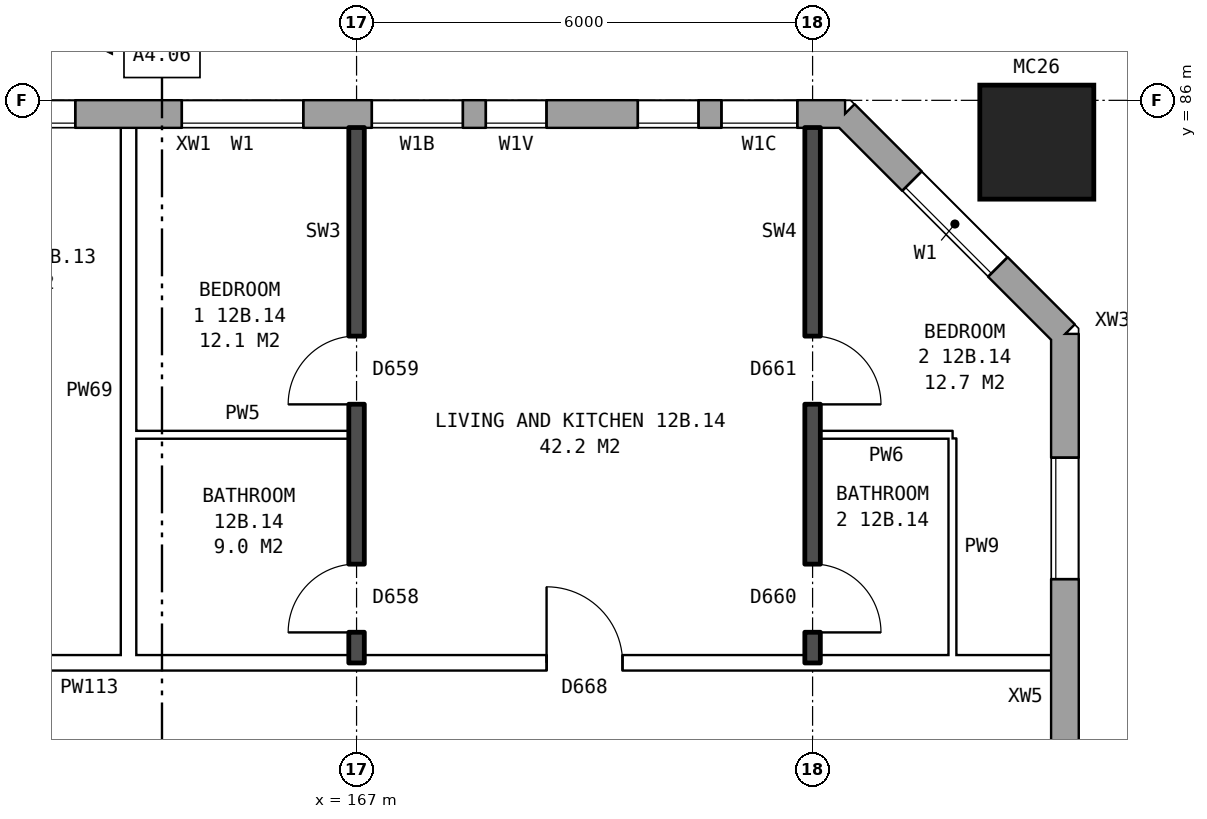
"""IFC4 building model, lengths in metres.
Left out: names, types, materials, properties, quantities, classifications, styles, units other than length and angle.
Written with IfcOpenShell. Run it as: python <this file> out.ifc"""

import sys

from ifc_helpers import new_model, si_unit, direction, frame, frame_2d, origin, origin_2d, place, context, subcontext, project, spatial, rectangle, hollow_rectangle, extrude, element, fill, save


model = new_model("IFC4")
c1 = context("Model", 3, precision=1e-05, world=origin(), true_north=direction((0.0, 1.0)))
c2 = subcontext(c1, "Body", "Model", "MODEL_VIEW")
j1 = project(units=[si_unit("LENGTHUNIT", "METRE"), si_unit("PLANEANGLEUNIT", "RADIAN")], contexts=[c1])
p1 = place(None, origin())
s1 = spatial("IfcSite", under=j1, at=p1, CompositionType="ELEMENT")
p2 = place(p1, origin())
s2 = spatial("IfcBuilding", under=s1, at=p2, CompositionType="ELEMENT")
p3 = place(p2, frame((0.0, 0.0, 47.4)))
s3 = spatial("IfcBuildingStorey", under=s2, at=p3, CompositionType="ELEMENT", Elevation=47.4)
p4 = place(p3, frame((175.95, 85.45, 0.0), z_axis=(0.0, 0.0, 1.0), x_axis=(1.0, 0.0, 0.0)))
e1 = element("IfcColumn", 1, at=p4, inside=s3, PredefinedType="COLUMN", context=c2, shape_type="SweptSolid", body=[
    extrude(hollow_rectangle(XDim=1.5, YDim=1.5, WallThickness=0.08, at=origin_2d()), origin(), (0.0, 0.0, 1.0), 3.1),
])
p5 = place(p3, frame((176.32, 57.075, 0.0), z_axis=(0.0, 0.0, 1.0), x_axis=(0.0, 1.0, 0.0)))
e2 = element("IfcWall", 2, at=p5, inside=s3, PredefinedType="STANDARD", context=c2, shape_type="SweptSolid", body=[
    extrude(rectangle(XDim=25.851, YDim=0.36, at=frame_2d((12.925, 0.0))), origin(), (0.0, 0.0, 1.0), 2.85),
])
p6 = place(p5, frame((1.625, 0.0, 0.8)))
e3 = element("IfcOpeningElement", 3, at=p6, cuts=e2, PredefinedType="OPENING", context=c2, shape_type="SweptSolid", body=[
    extrude(rectangle(XDim=1.6, YDim=1.8, at=frame_2d((0.8, 0.9))), frame((0.0, 0.19, 0.0), z_axis=(0.0, -1.0, 0.0), x_axis=(1.0, 0.0, 0.0)), (0.0, 0.0, 1.0), 0.38),
])
p7 = place(p5, frame((6.225, 0.0, 0.8)))
e4 = element("IfcOpeningElement", 4, at=p7, cuts=e2, PredefinedType="OPENING", context=c2, shape_type="SweptSolid", body=[
    extrude(rectangle(XDim=1.0, YDim=0.9, at=frame_2d((0.5, 0.45))), frame((0.0, 0.19, 0.0), z_axis=(0.0, -1.0, 0.0), x_axis=(1.0, 0.0, 0.0)), (0.0, 0.0, 1.0), 0.38),
])
p8 = place(p5, frame((7.625, 0.0, 0.8)))
e5 = element("IfcOpeningElement", 5, at=p8, cuts=e2, PredefinedType="OPENING", context=c2, shape_type="SweptSolid", body=[
    extrude(rectangle(XDim=1.6, YDim=1.8, at=frame_2d((0.8, 0.9))), frame((0.0, 0.19, 0.0), z_axis=(0.0, -1.0, 0.0), x_axis=(1.0, 0.0, 0.0)), (0.0, 0.0, 1.0), 0.38),
])
p9 = place(p5, frame((10.625, 0.0, 0.8)))
e6 = element("IfcOpeningElement", 6, at=p9, cuts=e2, PredefinedType="OPENING", context=c2, shape_type="SweptSolid", body=[
    extrude(rectangle(XDim=1.6, YDim=1.8, at=frame_2d((0.8, 0.9))), frame((0.0, 0.19, 0.0), z_axis=(0.0, -1.0, 0.0), x_axis=(1.0, 0.0, 0.0)), (0.0, 0.0, 1.0), 0.38),
])
p10 = place(p5, frame((13.625, 0.0, 0.8)))
e7 = element("IfcOpeningElement", 7, at=p10, cuts=e2, PredefinedType="OPENING", context=c2, shape_type="SweptSolid", body=[
    extrude(rectangle(XDim=1.6, YDim=1.8, at=frame_2d((0.8, 0.9))), frame((0.0, 0.19, 0.0), z_axis=(0.0, -1.0, 0.0), x_axis=(1.0, 0.0, 0.0)), (0.0, 0.0, 1.0), 0.38),
])
p11 = place(p5, frame((16.625, 0.0, 0.8)))
e8 = element("IfcOpeningElement", 8, at=p11, cuts=e2, PredefinedType="OPENING", context=c2, shape_type="SweptSolid", body=[
    extrude(rectangle(XDim=1.6, YDim=1.8, at=frame_2d((0.8, 0.9))), frame((0.0, 0.19, 0.0), z_axis=(0.0, -1.0, 0.0), x_axis=(1.0, 0.0, 0.0)), (0.0, 0.0, 1.0), 0.38),
])
p12 = place(p5, frame((9.525, 0.0, 0.8)))
e9 = element("IfcOpeningElement", 9, at=p12, cuts=e2, PredefinedType="OPENING", context=c2, shape_type="SweptSolid", body=[
    extrude(rectangle(XDim=0.8, YDim=1.8, at=frame_2d((0.4, 0.9))), frame((0.0, 0.19, 0.0), z_axis=(0.0, -1.0, 0.0), x_axis=(1.0, 0.0, 0.0)), (0.0, 0.0, 1.0), 0.38),
])
p13 = place(p5, frame((22.625, 0.0, 0.8)))
e10 = element("IfcOpeningElement", 10, at=p13, cuts=e2, PredefinedType="OPENING", context=c2, shape_type="SweptSolid", body=[
    extrude(rectangle(XDim=1.6, YDim=1.8, at=frame_2d((0.8, 0.9))), frame((0.0, 0.19, 0.0), z_axis=(0.0, -1.0, 0.0), x_axis=(1.0, 0.0, 0.0)), (0.0, 0.0, 1.0), 0.38),
])
p14 = place(p5, frame((12.525, 0.0, 0.8)))
e11 = element("IfcOpeningElement", 11, at=p14, cuts=e2, PredefinedType="OPENING", context=c2, shape_type="SweptSolid", body=[
    extrude(rectangle(XDim=0.8, YDim=1.8, at=frame_2d((0.4, 0.9))), frame((0.0, 0.19, 0.0), z_axis=(0.0, -1.0, 0.0), x_axis=(1.0, 0.0, 0.0)), (0.0, 0.0, 1.0), 0.38),
])
p15 = place(p5, frame((15.525, 0.0, 0.8)))
e12 = element("IfcOpeningElement", 12, at=p15, cuts=e2, PredefinedType="OPENING", context=c2, shape_type="SweptSolid", body=[
    extrude(rectangle(XDim=0.8, YDim=1.8, at=frame_2d((0.4, 0.9))), frame((0.0, 0.19, 0.0), z_axis=(0.0, -1.0, 0.0), x_axis=(1.0, 0.0, 0.0)), (0.0, 0.0, 1.0), 0.38),
])
p16 = place(p5, frame((18.525, 0.0, 0.8)))
e13 = element("IfcOpeningElement", 13, at=p16, cuts=e2, PredefinedType="OPENING", context=c2, shape_type="SweptSolid", body=[
    extrude(rectangle(XDim=1.0, YDim=0.9, at=frame_2d((0.5, 0.45))), frame((0.0, 0.19, 0.0), z_axis=(0.0, -1.0, 0.0), x_axis=(1.0, 0.0, 0.0)), (0.0, 0.0, 1.0), 0.38),
])
p17 = place(p3, frame((176.32, 82.925, 0.0), z_axis=(0.0, 0.0, 1.0), x_axis=(-0.707106781187, 0.707106781187, 0.0)))
e14 = element("IfcWall", 14, at=p17, inside=s3, PredefinedType="STANDARD", context=c2, shape_type="SweptSolid", body=[
    extrude(rectangle(XDim=4.094, YDim=0.36, at=frame_2d((2.047, 0.0))), origin(), (0.0, 0.0, 1.0), 2.85),
])
p18 = place(p17, frame((1.247, 0.0, 0.8)))
e15 = element("IfcOpeningElement", 15, at=p18, cuts=e14, PredefinedType="OPENING", context=c2, shape_type="SweptSolid", body=[
    extrude(rectangle(XDim=1.6, YDim=1.8, at=frame_2d((0.8, 0.9))), frame((0.0, 0.19, 0.0), z_axis=(0.0, -1.0, 0.0), x_axis=(1.0, 0.0, 0.0)), (0.0, 0.0, 1.0), 0.38),
])
p19 = place(p3, frame((173.425, 85.82, 0.0), z_axis=(0.0, 0.0, 1.0), x_axis=(-1.0, 0.0, 0.0)))
e16 = element("IfcWall", 16, at=p19, inside=s3, PredefinedType="STANDARD", context=c2, shape_type="SweptSolid", body=[
    extrude(rectangle(XDim=39.351, YDim=0.36, at=frame_2d((19.675, 0.0))), origin(), (0.0, 0.0, 1.0), 2.85),
])
p20 = place(p19, frame((0.625, 0.0, 0.8)))
e17 = element("IfcOpeningElement", 17, at=p20, cuts=e16, PredefinedType="OPENING", context=c2, shape_type="SweptSolid", body=[
    extrude(rectangle(XDim=1.0, YDim=1.8, at=frame_2d((0.5, 0.9))), frame((0.0, 0.19, 0.0), z_axis=(0.0, -1.0, 0.0), x_axis=(1.0, 0.0, 0.0)), (0.0, 0.0, 1.0), 0.38),
])
p21 = place(p19, frame((1.925, 0.0, 1.7)))
e18 = element("IfcOpeningElement", 18, at=p21, cuts=e16, PredefinedType="OPENING", context=c2, shape_type="SweptSolid", body=[
    extrude(rectangle(XDim=0.8, YDim=0.9, at=frame_2d((0.4, 0.45))), frame((0.0, 0.19, 0.0), z_axis=(0.0, -1.0, 0.0), x_axis=(1.0, 0.0, 0.0)), (0.0, 0.0, 1.0), 0.38),
])
p22 = place(p19, frame((7.125, 0.0, 0.8)))
e19 = element("IfcOpeningElement", 19, at=p22, cuts=e16, PredefinedType="OPENING", context=c2, shape_type="SweptSolid", body=[
    extrude(rectangle(XDim=1.6, YDim=1.8, at=frame_2d((0.8, 0.9))), frame((0.0, 0.19, 0.0), z_axis=(0.0, -1.0, 0.0), x_axis=(1.0, 0.0, 0.0)), (0.0, 0.0, 1.0), 0.38),
])
p23 = place(p19, frame((10.125, 0.0, 0.8)))
e20 = element("IfcOpeningElement", 20, at=p23, cuts=e16, PredefinedType="OPENING", context=c2, shape_type="SweptSolid", body=[
    extrude(rectangle(XDim=1.6, YDim=1.8, at=frame_2d((0.8, 0.9))), frame((0.0, 0.19, 0.0), z_axis=(0.0, -1.0, 0.0), x_axis=(1.0, 0.0, 0.0)), (0.0, 0.0, 1.0), 0.38),
])
p24 = place(p19, frame((13.125, 0.0, 0.8)))
e21 = element("IfcOpeningElement", 21, at=p24, cuts=e16, PredefinedType="OPENING", context=c2, shape_type="SweptSolid", body=[
    extrude(rectangle(XDim=1.6, YDim=1.8, at=frame_2d((0.8, 0.9))), frame((0.0, 0.19, 0.0), z_axis=(0.0, -1.0, 0.0), x_axis=(1.0, 0.0, 0.0)), (0.0, 0.0, 1.0), 0.38),
])
p25 = place(p19, frame((16.125, 0.0, 0.8)))
e22 = element("IfcOpeningElement", 22, at=p25, cuts=e16, PredefinedType="OPENING", context=c2, shape_type="SweptSolid", body=[
    extrude(rectangle(XDim=1.6, YDim=1.8, at=frame_2d((0.8, 0.9))), frame((0.0, 0.19, 0.0), z_axis=(0.0, -1.0, 0.0), x_axis=(1.0, 0.0, 0.0)), (0.0, 0.0, 1.0), 0.38),
])
p26 = place(p19, frame((19.125, 0.0, 0.8)))
e23 = element("IfcOpeningElement", 23, at=p26, cuts=e16, PredefinedType="OPENING", context=c2, shape_type="SweptSolid", body=[
    extrude(rectangle(XDim=1.6, YDim=1.8, at=frame_2d((0.8, 0.9))), frame((0.0, 0.19, 0.0), z_axis=(0.0, -1.0, 0.0), x_axis=(1.0, 0.0, 0.0)), (0.0, 0.0, 1.0), 0.38),
])
p27 = place(p19, frame((22.125, 0.0, 0.8)))
e24 = element("IfcOpeningElement", 24, at=p27, cuts=e16, PredefinedType="OPENING", context=c2, shape_type="SweptSolid", body=[
    extrude(rectangle(XDim=1.6, YDim=1.8, at=frame_2d((0.8, 0.9))), frame((0.0, 0.19, 0.0), z_axis=(0.0, -1.0, 0.0), x_axis=(1.0, 0.0, 0.0)), (0.0, 0.0, 1.0), 0.38),
])
p28 = place(p19, frame((25.125, 0.0, 0.8)))
e25 = element("IfcOpeningElement", 25, at=p28, cuts=e16, PredefinedType="OPENING", context=c2, shape_type="SweptSolid", body=[
    extrude(rectangle(XDim=1.6, YDim=1.8, at=frame_2d((0.8, 0.9))), frame((0.0, 0.19, 0.0), z_axis=(0.0, -1.0, 0.0), x_axis=(1.0, 0.0, 0.0)), (0.0, 0.0, 1.0), 0.38),
])
p29 = place(p19, frame((28.125, 0.0, 0.8)))
e26 = element("IfcOpeningElement", 26, at=p29, cuts=e16, PredefinedType="OPENING", context=c2, shape_type="SweptSolid", body=[
    extrude(rectangle(XDim=1.6, YDim=1.8, at=frame_2d((0.8, 0.9))), frame((0.0, 0.19, 0.0), z_axis=(0.0, -1.0, 0.0), x_axis=(1.0, 0.0, 0.0)), (0.0, 0.0, 1.0), 0.38),
])
p30 = place(p19, frame((31.125, 0.0, 0.8)))
e27 = element("IfcOpeningElement", 27, at=p30, cuts=e16, PredefinedType="OPENING", context=c2, shape_type="SweptSolid", body=[
    extrude(rectangle(XDim=1.6, YDim=1.8, at=frame_2d((0.8, 0.9))), frame((0.0, 0.19, 0.0), z_axis=(0.0, -1.0, 0.0), x_axis=(1.0, 0.0, 0.0)), (0.0, 0.0, 1.0), 0.38),
])
p31 = place(p19, frame((33.025, 0.0, 0.8)))
e28 = element("IfcOpeningElement", 28, at=p31, cuts=e16, PredefinedType="OPENING", context=c2, shape_type="SweptSolid", body=[
    extrude(rectangle(XDim=1.2, YDim=1.8, at=frame_2d((0.6, 0.9))), frame((0.0, 0.19, 0.0), z_axis=(0.0, -1.0, 0.0), x_axis=(1.0, 0.0, 0.0)), (0.0, 0.0, 1.0), 0.38),
])
p32 = place(p19, frame((36.625, 0.0, 1.7)))
e29 = element("IfcOpeningElement", 29, at=p32, cuts=e16, PredefinedType="OPENING", context=c2, shape_type="SweptSolid", body=[
    extrude(rectangle(XDim=0.8, YDim=0.9, at=frame_2d((0.4, 0.45))), frame((0.0, 0.19, 0.0), z_axis=(0.0, -1.0, 0.0), x_axis=(1.0, 0.0, 0.0)), (0.0, 0.0, 1.0), 0.38),
])
p33 = place(p19, frame((3.925, 0.0, 0.8)))
e30 = element("IfcOpeningElement", 30, at=p33, cuts=e16, PredefinedType="OPENING", context=c2, shape_type="SweptSolid", body=[
    extrude(rectangle(XDim=0.8, YDim=0.9, at=frame_2d((0.4, 0.45))), frame((0.0, 0.19, 0.0), z_axis=(0.0, -1.0, 0.0), x_axis=(1.0, 0.0, 0.0)), (0.0, 0.0, 1.0), 0.38),
])
p34 = place(p19, frame((5.025, 0.0, 0.8)))
e31 = element("IfcOpeningElement", 31, at=p34, cuts=e16, PredefinedType="OPENING", context=c2, shape_type="SweptSolid", body=[
    extrude(rectangle(XDim=1.2, YDim=1.8, at=frame_2d((0.6, 0.9))), frame((0.0, 0.19, 0.0), z_axis=(0.0, -1.0, 0.0), x_axis=(1.0, 0.0, 0.0)), (0.0, 0.0, 1.0), 0.38),
])
p35 = place(p19, frame((34.525, 0.0, 0.8)))
e32 = element("IfcOpeningElement", 32, at=p35, cuts=e16, PredefinedType="OPENING", context=c2, shape_type="SweptSolid", body=[
    extrude(rectangle(XDim=0.8, YDim=0.9, at=frame_2d((0.4, 0.45))), frame((0.0, 0.19, 0.0), z_axis=(0.0, -1.0, 0.0), x_axis=(1.0, 0.0, 0.0)), (0.0, 0.0, 1.0), 0.38),
])
p36 = place(p19, frame((37.725, 0.0, 0.8)))
e33 = element("IfcOpeningElement", 33, at=p36, cuts=e16, PredefinedType="OPENING", context=c2, shape_type="SweptSolid", body=[
    extrude(rectangle(XDim=1.2, YDim=1.8, at=frame_2d((0.6, 0.9))), frame((0.0, 0.19, 0.0), z_axis=(0.0, -1.0, 0.0), x_axis=(1.0, 0.0, 0.0)), (0.0, 0.0, 1.0), 0.38),
])
p37 = place(p3, frame((155.1, 78.6, 0.0), z_axis=(0.0, 0.0, 1.0), x_axis=(1.0, 0.0, 0.0)))
e34 = element("IfcWall", 34, at=p37, inside=s3, PredefinedType="PARTITIONING", context=c2, shape_type="SweptSolid", body=[
    extrude(rectangle(XDim=21.04, YDim=0.2, at=frame_2d((10.52, 0.0))), origin(), (0.0, 0.0, 1.0), 2.85),
])
p38 = place(p37, frame((2.45, 0.0, 0.0)))
e35 = element("IfcOpeningElement", 35, at=p38, cuts=e34, PredefinedType="OPENING", context=c2, shape_type="SweptSolid", body=[
    extrude(rectangle(XDim=1.0, YDim=2.1, at=frame_2d((0.5, 1.05))), frame((0.0, 0.11, 0.0), z_axis=(0.0, -1.0, 0.0), x_axis=(1.0, 0.0, 0.0)), (0.0, 0.0, 1.0), 0.22),
])
p39 = place(p37, frame((14.4, 0.0, 0.0)))
e36 = element("IfcOpeningElement", 36, at=p39, cuts=e34, PredefinedType="OPENING", context=c2, shape_type="SweptSolid", body=[
    extrude(rectangle(XDim=1.0, YDim=2.1, at=frame_2d((0.5, 1.05))), frame((0.0, 0.11, 0.0), z_axis=(0.0, -1.0, 0.0), x_axis=(1.0, 0.0, 0.0)), (0.0, 0.0, 1.0), 0.22),
])
p40 = place(p3, frame((164.1, 81.6, 0.0), z_axis=(0.0, 0.0, 1.0), x_axis=(1.0, 0.0, 0.0)))
e37 = element("IfcWall", 37, at=p40, inside=s3, PredefinedType="PARTITIONING", context=c2, shape_type="SweptSolid", body=[
    extrude(rectangle(XDim=2.8, YDim=0.1, at=frame_2d((1.4, 0.0))), origin(), (0.0, 0.0, 1.0), 2.85),
])
p41 = place(p3, frame((173.1, 81.6, 0.0), z_axis=(0.0, 0.0, 1.0), x_axis=(1.0, 0.0, 0.0)))
e38 = element("IfcWall", 38, at=p41, inside=s3, PredefinedType="PARTITIONING", context=c2, shape_type="SweptSolid", body=[
    extrude(rectangle(XDim=1.74, YDim=0.1, at=frame_2d((0.87, 0.0))), origin(), (0.0, 0.0, 1.0), 2.85),
])
p42 = place(p3, frame((164.0, 78.7, 0.0), z_axis=(0.0, 0.0, 1.0), x_axis=(0.0, 1.0, 0.0)))
e39 = element("IfcWall", 39, at=p42, inside=s3, PredefinedType="PARTITIONING", context=c2, shape_type="SweptSolid", body=[
    extrude(rectangle(XDim=6.94, YDim=0.2, at=frame_2d((3.47, 0.0))), origin(), (0.0, 0.0, 1.0), 2.85),
])
p43 = place(p3, frame((167.0, 78.6, 0.0), z_axis=(0.0, 0.0, 1.0), x_axis=(0.0, 1.0, 0.0)))
e40 = element("IfcWall", 40, at=p43, inside=s3, PredefinedType="SOLIDWALL", context=c2, shape_type="SweptSolid", body=[
    extrude(rectangle(XDim=7.04, YDim=0.2, at=frame_2d((3.52, 0.0))), origin(), (0.0, 0.0, 1.0), 2.85),
])
p44 = place(p43, frame((3.4, 0.0, 0.0)))
e41 = element("IfcOpeningElement", 41, at=p44, cuts=e40, PredefinedType="OPENING", context=c2, shape_type="SweptSolid", body=[
    extrude(rectangle(XDim=0.9, YDim=2.1, at=frame_2d((0.45, 1.05))), frame((0.0, 0.11, 0.0), z_axis=(0.0, -1.0, 0.0), x_axis=(1.0, 0.0, 0.0)), (0.0, 0.0, 1.0), 0.22),
])
p45 = place(p43, frame((0.4, 0.0, 0.0)))
e42 = element("IfcOpeningElement", 42, at=p45, cuts=e40, PredefinedType="OPENING", context=c2, shape_type="SweptSolid", body=[
    extrude(rectangle(XDim=0.9, YDim=2.1, at=frame_2d((0.45, 1.05))), frame((0.0, 0.11, 0.0), z_axis=(0.0, -1.0, 0.0), x_axis=(1.0, 0.0, 0.0)), (0.0, 0.0, 1.0), 0.22),
])
p46 = place(p3, frame((173.0, 78.6, 0.0), z_axis=(0.0, 0.0, 1.0), x_axis=(0.0, 1.0, 0.0)))
e43 = element("IfcWall", 43, at=p46, inside=s3, PredefinedType="SOLIDWALL", context=c2, shape_type="SweptSolid", body=[
    extrude(rectangle(XDim=7.04, YDim=0.2, at=frame_2d((3.52, 0.0))), origin(), (0.0, 0.0, 1.0), 2.85),
])
p47 = place(p46, frame((3.4, 0.0, 0.0)))
e44 = element("IfcOpeningElement", 44, at=p47, cuts=e43, PredefinedType="OPENING", context=c2, shape_type="SweptSolid", body=[
    extrude(rectangle(XDim=0.9, YDim=2.1, at=frame_2d((0.45, 1.05))), frame((0.0, 0.11, 0.0), z_axis=(0.0, -1.0, 0.0), x_axis=(1.0, 0.0, 0.0)), (0.0, 0.0, 1.0), 0.22),
])
p48 = place(p46, frame((0.4, 0.0, 0.0)))
e45 = element("IfcOpeningElement", 45, at=p48, cuts=e43, PredefinedType="OPENING", context=c2, shape_type="SweptSolid", body=[
    extrude(rectangle(XDim=0.9, YDim=2.1, at=frame_2d((0.45, 1.05))), frame((0.0, 0.11, 0.0), z_axis=(0.0, -1.0, 0.0), x_axis=(1.0, 0.0, 0.0)), (0.0, 0.0, 1.0), 0.22),
])
p49 = place(p3, frame((174.84, 78.7, 0.0), z_axis=(0.0, 0.0, 1.0), x_axis=(0.0, 1.0, 0.0)))
e46 = element("IfcWall", 46, at=p49, inside=s3, PredefinedType="PARTITIONING", context=c2, shape_type="SweptSolid", body=[
    extrude(rectangle(XDim=2.85, YDim=0.1, at=frame_2d((1.425, 0.0))), origin(), (0.0, 0.0, 1.0), 2.85),
])
p50 = place(p13, origin())
e47 = element("IfcWindow", 47, at=p50, inside=s3, PartitioningType="SINGLE_PANEL", PredefinedType="WINDOW", context=c2, shape_type="SweptSolid", body=[
    extrude(rectangle(XDim=1.6, YDim=1.8, at=frame_2d((0.8, 0.9))), frame((0.0, 0.15, 0.0), z_axis=(0.0, -1.0, 0.0), x_axis=(1.0, 0.0, 0.0)), (0.0, 0.0, 1.0), 0.06),
])
fill(e10, e47)
p51 = place(p18, origin())
e48 = element("IfcWindow", 48, at=p51, inside=s3, PartitioningType="SINGLE_PANEL", PredefinedType="WINDOW", context=c2, shape_type="SweptSolid", body=[
    extrude(rectangle(XDim=1.6, YDim=1.8, at=frame_2d((0.8, 0.9))), frame((0.0, 0.15, 0.0), z_axis=(0.0, -1.0, 0.0), x_axis=(1.0, 0.0, 0.0)), (0.0, 0.0, 1.0), 0.06),
])
fill(e15, e48)
p52 = place(p20, origin())
e49 = element("IfcWindow", 49, at=p52, inside=s3, PartitioningType="SINGLE_PANEL", PredefinedType="WINDOW", context=c2, shape_type="SweptSolid", body=[
    extrude(rectangle(XDim=1.0, YDim=1.8, at=frame_2d((0.5, 0.9))), frame((0.0, 0.15, 0.0), z_axis=(0.0, -1.0, 0.0), x_axis=(1.0, 0.0, 0.0)), (0.0, 0.0, 1.0), 0.06),
])
fill(e17, e49)
p53 = place(p21, origin())
e50 = element("IfcWindow", 50, at=p53, inside=s3, PartitioningType="SINGLE_PANEL", PredefinedType="WINDOW", context=c2, shape_type="SweptSolid", body=[
    extrude(rectangle(XDim=0.8, YDim=0.9, at=frame_2d((0.4, 0.45))), frame((0.0, 0.15, 0.0), z_axis=(0.0, -1.0, 0.0), x_axis=(1.0, 0.0, 0.0)), (0.0, 0.0, 1.0), 0.06),
])
fill(e18, e50)
p54 = place(p22, origin())
e51 = element("IfcWindow", 51, at=p54, inside=s3, PartitioningType="SINGLE_PANEL", PredefinedType="WINDOW", context=c2, shape_type="SweptSolid", body=[
    extrude(rectangle(XDim=1.6, YDim=1.8, at=frame_2d((0.8, 0.9))), frame((0.0, 0.15, 0.0), z_axis=(0.0, -1.0, 0.0), x_axis=(1.0, 0.0, 0.0)), (0.0, 0.0, 1.0), 0.06),
])
fill(e19, e51)
p55 = place(p23, origin())
e52 = element("IfcWindow", 52, at=p55, inside=s3, PartitioningType="SINGLE_PANEL", PredefinedType="WINDOW", context=c2, shape_type="SweptSolid", body=[
    extrude(rectangle(XDim=1.6, YDim=1.8, at=frame_2d((0.8, 0.9))), frame((0.0, 0.15, 0.0), z_axis=(0.0, -1.0, 0.0), x_axis=(1.0, 0.0, 0.0)), (0.0, 0.0, 1.0), 0.06),
])
fill(e20, e52)
p56 = place(p44, origin())
e53 = element("IfcDoor", 53, at=p56, inside=s3, OperationType="SINGLE_SWING_LEFT", PredefinedType="DOOR", context=c2, shape_type="SweptSolid", body=[
    extrude(rectangle(XDim=0.9, YDim=2.1, at=frame_2d((0.45, 1.05))), frame((0.0, 0.025, 0.0), z_axis=(0.0, -1.0, 0.0), x_axis=(1.0, 0.0, 0.0)), (0.0, 0.0, 1.0), 0.05),
])
fill(e41, e53)
p57 = place(p47, frame((0.9, 0.0, 0.0), z_axis=(0.0, 0.0, 1.0), x_axis=(-1.0, 0.0, 0.0)))
e54 = element("IfcDoor", 54, at=p57, inside=s3, OperationType="SINGLE_SWING_RIGHT", PredefinedType="DOOR", context=c2, shape_type="SweptSolid", body=[
    extrude(rectangle(XDim=0.9, YDim=2.1, at=frame_2d((0.45, 1.05))), frame((0.0, 0.025, 0.0), z_axis=(0.0, -1.0, 0.0), x_axis=(1.0, 0.0, 0.0)), (0.0, 0.0, 1.0), 0.05),
])
fill(e44, e54)
p58 = place(p39, origin())
e55 = element("IfcDoor", 55, at=p58, inside=s3, OperationType="SINGLE_SWING_LEFT", PredefinedType="DOOR", context=c2, shape_type="SweptSolid", body=[
    extrude(rectangle(XDim=1.0, YDim=2.1, at=frame_2d((0.5, 1.05))), frame((0.0, 0.025, 0.0), z_axis=(0.0, -1.0, 0.0), x_axis=(1.0, 0.0, 0.0)), (0.0, 0.0, 1.0), 0.05),
])
fill(e36, e55)
p59 = place(p45, origin())
e56 = element("IfcDoor", 56, at=p59, inside=s3, OperationType="SINGLE_SWING_LEFT", PredefinedType="DOOR", context=c2, shape_type="SweptSolid", body=[
    extrude(rectangle(XDim=0.9, YDim=2.1, at=frame_2d((0.45, 1.05))), frame((0.0, 0.025, 0.0), z_axis=(0.0, -1.0, 0.0), x_axis=(1.0, 0.0, 0.0)), (0.0, 0.0, 1.0), 0.05),
])
fill(e42, e56)
p60 = place(p48, frame((0.9, 0.0, 0.0), z_axis=(0.0, 0.0, 1.0), x_axis=(-1.0, 0.0, 0.0)))
e57 = element("IfcDoor", 57, at=p60, inside=s3, OperationType="SINGLE_SWING_RIGHT", PredefinedType="DOOR", context=c2, shape_type="SweptSolid", body=[
    extrude(rectangle(XDim=0.9, YDim=2.1, at=frame_2d((0.45, 1.05))), frame((0.0, 0.025, 0.0), z_axis=(0.0, -1.0, 0.0), x_axis=(1.0, 0.0, 0.0)), (0.0, 0.0, 1.0), 0.05),
])
fill(e45, e57)
p61 = place(p33, origin())
e58 = element("IfcWindow", 58, at=p61, inside=s3, PartitioningType="SINGLE_PANEL", PredefinedType="WINDOW", context=c2, shape_type="SweptSolid", body=[
    extrude(rectangle(XDim=0.8, YDim=0.9, at=frame_2d((0.4, 0.45))), frame((0.0, 0.15, 0.0), z_axis=(0.0, -1.0, 0.0), x_axis=(1.0, 0.0, 0.0)), (0.0, 0.0, 1.0), 0.06),
])
fill(e30, e58)
p62 = place(p34, origin())
e59 = element("IfcWindow", 59, at=p62, inside=s3, PartitioningType="SINGLE_PANEL", PredefinedType="WINDOW", context=c2, shape_type="SweptSolid", body=[
    extrude(rectangle(XDim=1.2, YDim=1.8, at=frame_2d((0.6, 0.9))), frame((0.0, 0.15, 0.0), z_axis=(0.0, -1.0, 0.0), x_axis=(1.0, 0.0, 0.0)), (0.0, 0.0, 1.0), 0.06),
])
fill(e31, e59)
save(model, sys.argv[1])
